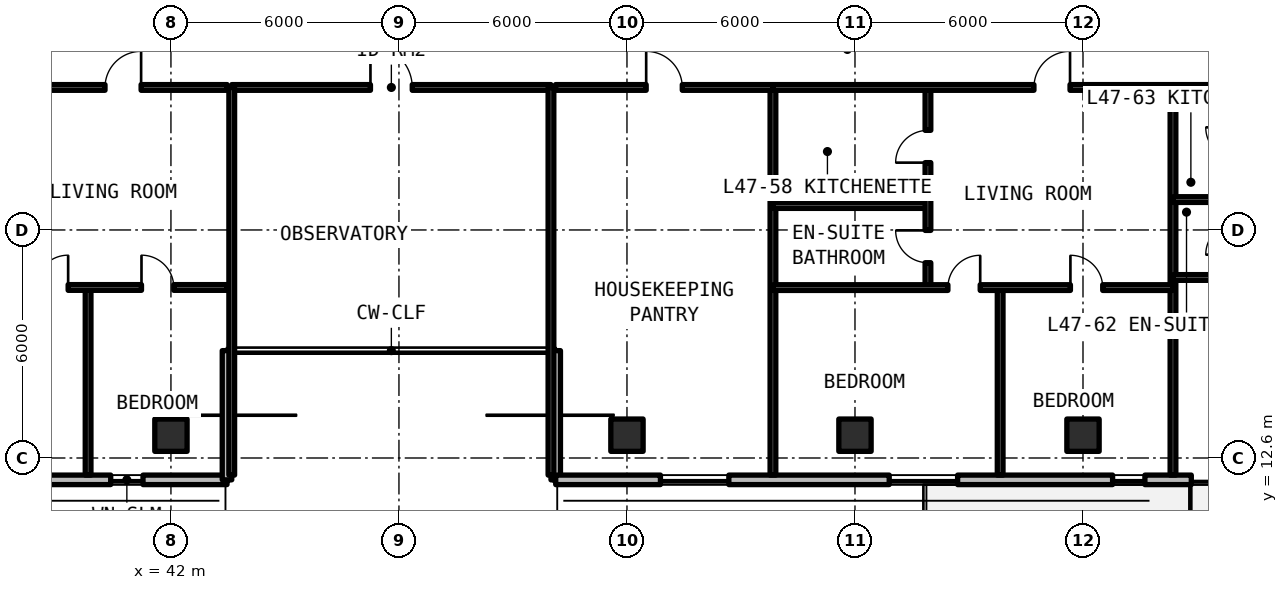
"""IFC4 building model, lengths in metres.
Left out: names, types, materials, properties, quantities, classifications, styles, units other than length and angle.
Written with IfcOpenShell. Run it as: python <this file> out.ifc"""

import sys

from ifc_helpers import new_model, si_unit, direction, frame, frame_2d, origin, origin_2d, place, context, subcontext, project, spatial, rectangle, extrude, element, fill, save


model = new_model("IFC4")
c1 = context("Model", 3, precision=1e-05, world=origin(), true_north=direction((0.0, 1.0)))
c2 = subcontext(c1, "Body", "Model", "MODEL_VIEW")
j1 = project(units=[si_unit("LENGTHUNIT", "METRE"), si_unit("PLANEANGLEUNIT", "RADIAN")], contexts=[c1])
p1 = place(None, origin())
s1 = spatial("IfcSite", under=j1, at=p1, CompositionType="ELEMENT")
p2 = place(p1, origin())
s2 = spatial("IfcBuilding", under=s1, at=p2, CompositionType="ELEMENT")
p3 = place(p2, frame((0.0, 0.0, 169.29)))
s3 = spatial("IfcBuildingStorey", under=s2, at=p3, CompositionType="ELEMENT", Elevation=169.29)
for number, where, z_axis, x_axis in (
    (1, (42.0, 13.2, 0.0), (0.0, 0.0, 1.0), (1.0, 0.0, 0.0)),
    (2, (54.0, 13.2, 0.0), (0.0, 0.0, 1.0), (1.0, 0.0, 0.0)),
    (3, (60.0, 13.2, 0.0), (0.0, 0.0, 1.0), (1.0, 0.0, 0.0)),
    (4, (66.0, 13.2, 0.0), (0.0, 0.0, 1.0), (1.0, 0.0, 0.0)),
):
    element("IfcColumn", number, at=place(p3, frame(where, z_axis=z_axis, x_axis=x_axis)), inside=s3, PredefinedType="COLUMN", context=c2, shape_type="SweptSolid", body=[
        extrude(rectangle(XDim=0.85, YDim=0.85, at=origin_2d()), origin(), (0.0, 0.0, 1.0), 3.63),
    ])
p4 = place(p3, frame((23.852, 12.025, 0.0), z_axis=(0.0, 0.0, 1.0), x_axis=(1.0, 0.0, 0.0)))
e5 = element("IfcWall", 5, at=p4, inside=s3, PredefinedType="SOLIDWALL", context=c2, shape_type="SweptSolid", body=[
    extrude(rectangle(XDim=19.623, YDim=0.25, at=frame_2d((9.812, 0.0))), origin(), (0.0, 0.0, 1.0), 3.35),
])
p5 = place(p4, frame((7.948, 0.0, 0.0)))
e6 = element("IfcOpeningElement", 6, at=p5, cuts=e5, PredefinedType="OPENING", context=c2, shape_type="SweptSolid", body=[
    extrude(rectangle(XDim=1.1, YDim=2.15, at=frame_2d((0.55, 1.075))), frame((0.0, 0.135, 0.0), z_axis=(0.0, -1.0, 0.0), x_axis=(1.0, 0.0, 0.0)), (0.0, 0.0, 1.0), 0.27),
])
p6 = place(p4, frame((1.818, 0.0, 0.78)))
e7 = element("IfcOpeningElement", 7, at=p6, cuts=e5, PredefinedType="OPENING", context=c2, shape_type="SweptSolid", body=[
    extrude(rectangle(XDim=1.8, YDim=1.66, at=frame_2d((0.9, 0.83))), frame((0.0, 0.135, 0.0), z_axis=(0.0, -1.0, 0.0), x_axis=(1.0, 0.0, 0.0)), (0.0, 0.0, 1.0), 0.27),
])
p7 = place(p4, frame((13.051, 0.0, 0.78)))
e8 = element("IfcOpeningElement", 8, at=p7, cuts=e5, PredefinedType="OPENING", context=c2, shape_type="SweptSolid", body=[
    extrude(rectangle(XDim=1.8, YDim=1.66, at=frame_2d((0.9, 0.83))), frame((0.0, 0.135, 0.0), z_axis=(0.0, -1.0, 0.0), x_axis=(1.0, 0.0, 0.0)), (0.0, 0.0, 1.0), 0.27),
])
p8 = place(p4, frame((16.563, 0.0, 0.78)))
e9 = element("IfcOpeningElement", 9, at=p8, cuts=e5, PredefinedType="OPENING", context=c2, shape_type="SweptSolid", body=[
    extrude(rectangle(XDim=0.85, YDim=1.65, at=frame_2d((0.425, 0.825))), frame((0.0, 0.135, 0.0), z_axis=(0.0, -1.0, 0.0), x_axis=(1.0, 0.0, 0.0)), (0.0, 0.0, 1.0), 0.27),
])
for number, where, z_axis, x_axis in (
    (10, (43.475, 12.025, 0.0), (0.0, 0.0, 1.0), (0.0, 1.0, 0.0)),
    (11, (52.125, 15.425, 0.0), (0.0, 0.0, 1.0), (0.0, -1.0, 0.0)),
):
    element("IfcWall", number, at=place(p3, frame(where, z_axis=z_axis, x_axis=x_axis)), inside=s3, PredefinedType="SOLIDWALL", context=c2, shape_type="SweptSolid", body=[
        extrude(rectangle(XDim=3.4, YDim=0.25, at=frame_2d((1.7, 0.0))), origin(), (0.0, 0.0, 1.0), 3.35),
    ])
p9 = place(p3, frame((52.125, 12.025, 0.0), z_axis=(0.0, 0.0, 1.0), x_axis=(1.0, 0.0, 0.0)))
e12 = element("IfcWall", 12, at=p9, inside=s3, PredefinedType="SOLIDWALL", context=c2, shape_type="SweptSolid", body=[
    extrude(rectangle(XDim=43.623, YDim=0.25, at=frame_2d((21.812, 0.0))), origin(), (0.0, 0.0, 1.0), 3.35),
])
p10 = place(p9, frame((16.725, 0.0, 0.0)))
e13 = element("IfcOpeningElement", 13, at=p10, cuts=e12, PredefinedType="OPENING", context=c2, shape_type="SweptSolid", body=[
    extrude(rectangle(XDim=1.1, YDim=2.15, at=frame_2d((0.55, 1.075))), frame((0.0, 0.135, 0.0), z_axis=(0.0, -1.0, 0.0), x_axis=(1.0, 0.0, 0.0)), (0.0, 0.0, 1.0), 0.27),
])
p11 = place(p9, frame((27.575, 0.0, 0.0)))
e14 = element("IfcOpeningElement", 14, at=p11, cuts=e12, PredefinedType="OPENING", context=c2, shape_type="SweptSolid", body=[
    extrude(rectangle(XDim=1.1, YDim=2.15, at=frame_2d((0.55, 1.075))), frame((0.0, 0.135, 0.0), z_axis=(0.0, -1.0, 0.0), x_axis=(1.0, 0.0, 0.0)), (0.0, 0.0, 1.0), 0.27),
])
p12 = place(p9, frame((2.756, 0.0, 0.78)))
e15 = element("IfcOpeningElement", 15, at=p12, cuts=e12, PredefinedType="OPENING", context=c2, shape_type="SweptSolid", body=[
    extrude(rectangle(XDim=1.8, YDim=1.66, at=frame_2d((0.9, 0.83))), frame((0.0, 0.135, 0.0), z_axis=(0.0, -1.0, 0.0), x_axis=(1.0, 0.0, 0.0)), (0.0, 0.0, 1.0), 0.27),
])
p13 = place(p9, frame((8.776, 0.0, 0.78)))
e16 = element("IfcOpeningElement", 16, at=p13, cuts=e12, PredefinedType="OPENING", context=c2, shape_type="SweptSolid", body=[
    extrude(rectangle(XDim=1.8, YDim=1.66, at=frame_2d((0.9, 0.83))), frame((0.0, 0.135, 0.0), z_axis=(0.0, -1.0, 0.0), x_axis=(1.0, 0.0, 0.0)), (0.0, 0.0, 1.0), 0.27),
])
p14 = place(p9, frame((14.654, 0.0, 0.78)))
e17 = element("IfcOpeningElement", 17, at=p14, cuts=e12, PredefinedType="OPENING", context=c2, shape_type="SweptSolid", body=[
    extrude(rectangle(XDim=0.85, YDim=1.65, at=frame_2d((0.425, 0.825))), frame((0.0, 0.135, 0.0), z_axis=(0.0, -1.0, 0.0), x_axis=(1.0, 0.0, 0.0)), (0.0, 0.0, 1.0), 0.27),
])
p15 = place(p9, frame((23.159, 0.0, 0.78)))
e18 = element("IfcOpeningElement", 18, at=p15, cuts=e12, PredefinedType="OPENING", context=c2, shape_type="SweptSolid", body=[
    extrude(rectangle(XDim=1.8, YDim=1.66, at=frame_2d((0.9, 0.83))), frame((0.0, 0.135, 0.0), z_axis=(0.0, -1.0, 0.0), x_axis=(1.0, 0.0, 0.0)), (0.0, 0.0, 1.0), 0.27),
])
p16 = place(p9, frame((38.451, 0.0, 0.78)))
e19 = element("IfcOpeningElement", 19, at=p16, cuts=e12, PredefinedType="OPENING", context=c2, shape_type="SweptSolid", body=[
    extrude(rectangle(XDim=0.85, YDim=1.65, at=frame_2d((0.425, 0.825))), frame((0.0, 0.135, 0.0), z_axis=(0.0, -1.0, 0.0), x_axis=(1.0, 0.0, 0.0)), (0.0, 0.0, 1.0), 0.27),
])
p17 = place(p9, frame((40.725, 0.0, 0.78)))
e20 = element("IfcOpeningElement", 20, at=p17, cuts=e12, PredefinedType="OPENING", context=c2, shape_type="SweptSolid", body=[
    extrude(rectangle(XDim=1.8, YDim=1.66, at=frame_2d((0.9, 0.83))), frame((0.0, 0.135, 0.0), z_axis=(0.0, -1.0, 0.0), x_axis=(1.0, 0.0, 0.0)), (0.0, 0.0, 1.0), 0.27),
])
p18 = place(p3, frame((43.6, 22.35, 0.0), z_axis=(0.0, 0.0, 1.0), x_axis=(1.0, 0.0, 0.0)))
e21 = element("IfcWall", 21, at=p18, inside=s3, PredefinedType="SOLIDWALL", context=c2, shape_type="SweptSolid", body=[
    extrude(rectangle(XDim=8.4, YDim=0.15, at=frame_2d((4.2, 0.0))), origin(), (0.0, 0.0, 1.0), 2.57),
])
p19 = place(p18, frame((3.65, 0.0, 0.0)))
e22 = element("IfcOpeningElement", 22, at=p19, cuts=e21, PredefinedType="OPENING", context=c2, shape_type="SweptSolid", body=[
    extrude(rectangle(XDim=1.1, YDim=2.15, at=frame_2d((0.55, 1.075))), frame((0.0, 0.085, 0.0), z_axis=(0.0, -1.0, 0.0), x_axis=(1.0, 0.0, 0.0)), (0.0, 0.0, 1.0), 0.17),
])
for number, where, z_axis, x_axis in (
    (23, (43.6, 12.15, 0.0), (0.0, 0.0, 1.0), (0.0, 1.0, 0.0)),
    (24, (52.0, 12.15, 0.0), (0.0, 0.0, 1.0), (0.0, 1.0, 0.0)),
):
    element("IfcWall", number, at=place(p3, frame(where, z_axis=z_axis, x_axis=x_axis)), inside=s3, PredefinedType="SOLIDWALL", context=c2, shape_type="SweptSolid", body=[
        extrude(rectangle(XDim=10.2, YDim=0.15, at=frame_2d((5.1, 0.0))), origin(), (0.0, 0.0, 1.0), 2.57),
    ])
p20 = place(p3, frame((39.82, 12.15, 0.0), z_axis=(0.0, 0.0, 1.0), x_axis=(0.0, 1.0, 0.0)))
e25 = element("IfcWall", 25, at=p20, inside=s3, PredefinedType="PARTITIONING", context=c2, shape_type="SweptSolid", body=[
    extrude(rectangle(XDim=4.937, YDim=0.15, at=frame_2d((2.469, 0.0))), origin(), (0.0, 0.0, 1.0), 2.57),
])
p21 = place(p3, frame((33.845, 17.087, 0.0), z_axis=(0.0, 0.0, 1.0), x_axis=(1.0, 0.0, 0.0)))
e26 = element("IfcWall", 26, at=p21, inside=s3, PredefinedType="PARTITIONING", context=c2, shape_type="SweptSolid", body=[
    extrude(rectangle(XDim=9.635, YDim=0.15, at=frame_2d((4.818, 0.0))), origin(), (0.0, 0.0, 1.0), 2.57),
])
p22 = place(p21, frame((4.6, 0.0, 0.0)))
e27 = element("IfcOpeningElement", 27, at=p22, cuts=e26, PredefinedType="OPENING", context=c2, shape_type="SweptSolid", body=[
    extrude(rectangle(XDim=0.85, YDim=2.1, at=frame_2d((0.425, 1.05))), frame((0.0, 0.085, 0.0), z_axis=(0.0, -1.0, 0.0), x_axis=(1.0, 0.0, 0.0)), (0.0, 0.0, 1.0), 0.17),
])
p23 = place(p21, frame((7.38, 0.0, 0.0)))
e28 = element("IfcOpeningElement", 28, at=p23, cuts=e26, PredefinedType="OPENING", context=c2, shape_type="SweptSolid", body=[
    extrude(rectangle(XDim=0.85, YDim=2.1, at=frame_2d((0.425, 1.05))), frame((0.0, 0.085, 0.0), z_axis=(0.0, -1.0, 0.0), x_axis=(1.0, 0.0, 0.0)), (0.0, 0.0, 1.0), 0.17),
])
p24 = place(p3, frame((33.845, 22.35, 0.0), z_axis=(0.0, 0.0, 1.0), x_axis=(1.0, 0.0, 0.0)))
e29 = element("IfcWall", 29, at=p24, inside=s3, PredefinedType="SOLIDWALL", context=c2, shape_type="SweptSolid", body=[
    extrude(rectangle(XDim=9.635, YDim=0.15, at=frame_2d((4.818, 0.0))), origin(), (0.0, 0.0, 1.0), 2.57),
])
p25 = place(p24, frame((6.42, 0.0, 0.0)))
e30 = element("IfcOpeningElement", 30, at=p25, cuts=e29, PredefinedType="OPENING", context=c2, shape_type="SweptSolid", body=[
    extrude(rectangle(XDim=0.95, YDim=2.15, at=frame_2d((0.475, 1.075))), frame((0.0, 0.085, 0.0), z_axis=(0.0, -1.0, 0.0), x_axis=(1.0, 0.0, 0.0)), (0.0, 0.0, 1.0), 0.17),
])
p26 = place(p3, frame((57.841, 12.15, 0.0), z_axis=(0.0, 0.0, 1.0), x_axis=(0.0, 1.0, 0.0)))
e31 = element("IfcWall", 31, at=p26, inside=s3, PredefinedType="SOLIDWALL", context=c2, shape_type="SweptSolid", body=[
    extrude(rectangle(XDim=10.2, YDim=0.15, at=frame_2d((5.1, 0.0))), origin(), (0.0, 0.0, 1.0), 2.57),
])
p27 = place(p3, frame((52.12, 22.35, 0.0), z_axis=(0.0, 0.0, 1.0), x_axis=(1.0, 0.0, 0.0)))
e32 = element("IfcWall", 32, at=p27, inside=s3, PredefinedType="SOLIDWALL", context=c2, shape_type="SweptSolid", body=[
    extrude(rectangle(XDim=5.721, YDim=0.15, at=frame_2d((2.86, 0.0))), origin(), (0.0, 0.0, 1.0), 2.57),
])
p28 = place(p27, frame((2.385, 0.0, 0.0)))
e33 = element("IfcOpeningElement", 33, at=p28, cuts=e32, PredefinedType="OPENING", context=c2, shape_type="SweptSolid", body=[
    extrude(rectangle(XDim=0.95, YDim=2.15, at=frame_2d((0.475, 1.075))), frame((0.0, 0.085, 0.0), z_axis=(0.0, -1.0, 0.0), x_axis=(1.0, 0.0, 0.0)), (0.0, 0.0, 1.0), 0.17),
])
p29 = place(p3, frame((68.368, 12.15, 0.0), z_axis=(0.0, 0.0, 1.0), x_axis=(0.0, 1.0, 0.0)))
e34 = element("IfcWall", 34, at=p29, inside=s3, PredefinedType="SOLIDWALL", context=c2, shape_type="SweptSolid", body=[
    extrude(rectangle(XDim=10.2, YDim=0.15, at=frame_2d((5.1, 0.0))), origin(), (0.0, 0.0, 1.0), 2.57),
])
p30 = place(p3, frame((57.841, 19.243, 0.0), z_axis=(0.0, 0.0, 1.0), x_axis=(1.0, 0.0, 0.0)))
e35 = element("IfcWall", 35, at=p30, inside=s3, PredefinedType="PARTITIONING", context=c2, shape_type="SweptSolid", body=[
    extrude(rectangle(XDim=4.079, YDim=0.15, at=frame_2d((2.04, 0.0))), origin(), (0.0, 0.0, 1.0), 2.57),
])
p31 = place(p3, frame((61.92, 17.084, 0.0), z_axis=(0.0, 0.0, 1.0), x_axis=(0.0, 1.0, 0.0)))
e36 = element("IfcWall", 36, at=p31, inside=s3, PredefinedType="PARTITIONING", context=c2, shape_type="SweptSolid", body=[
    extrude(rectangle(XDim=5.266, YDim=0.15, at=frame_2d((2.633, 0.0))), origin(), (0.0, 0.0, 1.0), 2.57),
])
p32 = place(p31, frame((0.655, 0.0, 0.0)))
e37 = element("IfcOpeningElement", 37, at=p32, cuts=e36, PredefinedType="OPENING", context=c2, shape_type="SweptSolid", body=[
    extrude(rectangle(XDim=0.85, YDim=2.1, at=frame_2d((0.425, 1.05))), frame((0.0, 0.085, 0.0), z_axis=(0.0, -1.0, 0.0), x_axis=(1.0, 0.0, 0.0)), (0.0, 0.0, 1.0), 0.17),
])
p33 = place(p31, frame((3.288, 0.0, 0.0)))
e38 = element("IfcOpeningElement", 38, at=p33, cuts=e36, PredefinedType="OPENING", context=c2, shape_type="SweptSolid", body=[
    extrude(rectangle(XDim=0.85, YDim=2.1, at=frame_2d((0.425, 1.05))), frame((0.0, 0.085, 0.0), z_axis=(0.0, -1.0, 0.0), x_axis=(1.0, 0.0, 0.0)), (0.0, 0.0, 1.0), 0.17),
])
p34 = place(p3, frame((63.82, 12.15, 0.0), z_axis=(0.0, 0.0, 1.0), x_axis=(0.0, 1.0, 0.0)))
e39 = element("IfcWall", 39, at=p34, inside=s3, PredefinedType="PARTITIONING", context=c2, shape_type="SweptSolid", body=[
    extrude(rectangle(XDim=4.934, YDim=0.15, at=frame_2d((2.467, 0.0))), origin(), (0.0, 0.0, 1.0), 2.57),
])
p35 = place(p3, frame((57.841, 17.084, 0.0), z_axis=(0.0, 0.0, 1.0), x_axis=(1.0, 0.0, 0.0)))
e40 = element("IfcWall", 40, at=p35, inside=s3, PredefinedType="PARTITIONING", context=c2, shape_type="SweptSolid", body=[
    extrude(rectangle(XDim=10.527, YDim=0.15, at=frame_2d((5.263, 0.0))), origin(), (0.0, 0.0, 1.0), 2.57),
])
p36 = place(p35, frame((4.604, 0.0, 0.0)))
e41 = element("IfcOpeningElement", 41, at=p36, cuts=e40, PredefinedType="OPENING", context=c2, shape_type="SweptSolid", body=[
    extrude(rectangle(XDim=0.85, YDim=2.1, at=frame_2d((0.425, 1.05))), frame((0.0, 0.085, 0.0), z_axis=(0.0, -1.0, 0.0), x_axis=(1.0, 0.0, 0.0)), (0.0, 0.0, 1.0), 0.17),
])
p37 = place(p35, frame((7.828, 0.0, 0.0)))
e42 = element("IfcOpeningElement", 42, at=p37, cuts=e40, PredefinedType="OPENING", context=c2, shape_type="SweptSolid", body=[
    extrude(rectangle(XDim=0.85, YDim=2.1, at=frame_2d((0.425, 1.05))), frame((0.0, 0.085, 0.0), z_axis=(0.0, -1.0, 0.0), x_axis=(1.0, 0.0, 0.0)), (0.0, 0.0, 1.0), 0.17),
])
p38 = place(p3, frame((57.841, 22.35, 0.0), z_axis=(0.0, 0.0, 1.0), x_axis=(1.0, 0.0, 0.0)))
e43 = element("IfcWall", 43, at=p38, inside=s3, PredefinedType="SOLIDWALL", context=c2, shape_type="SweptSolid", body=[
    extrude(rectangle(XDim=10.527, YDim=0.15, at=frame_2d((5.263, 0.0))), origin(), (0.0, 0.0, 1.0), 2.57),
])
p39 = place(p38, frame((6.868, 0.0, 0.0)))
e44 = element("IfcOpeningElement", 44, at=p39, cuts=e43, PredefinedType="OPENING", context=c2, shape_type="SweptSolid", body=[
    extrude(rectangle(XDim=0.95, YDim=2.15, at=frame_2d((0.475, 1.075))), frame((0.0, 0.085, 0.0), z_axis=(0.0, -1.0, 0.0), x_axis=(1.0, 0.0, 0.0)), (0.0, 0.0, 1.0), 0.17),
])
p40 = place(p3, frame((68.368, 19.4, 0.0), z_axis=(0.0, 0.0, 1.0), x_axis=(1.0, 0.0, 0.0)))
e45 = element("IfcWall", 45, at=p40, inside=s3, PredefinedType="PARTITIONING", context=c2, shape_type="SweptSolid", body=[
    extrude(rectangle(XDim=1.712, YDim=0.15, at=frame_2d((0.856, 0.0))), origin(), (0.0, 0.0, 1.0), 2.57),
])
p41 = place(p3, frame((68.368, 17.35, 0.0), z_axis=(0.0, 0.0, 1.0), x_axis=(1.0, 0.0, 0.0)))
e46 = element("IfcWall", 46, at=p41, inside=s3, PredefinedType="PARTITIONING", context=c2, shape_type="SweptSolid", body=[
    extrude(rectangle(XDim=10.298, YDim=0.15, at=frame_2d((5.149, 0.0))), origin(), (0.0, 0.0, 1.0), 2.57),
])
p42 = place(p41, frame((3.109, 0.0, 0.0)))
e47 = element("IfcOpeningElement", 47, at=p42, cuts=e46, PredefinedType="OPENING", context=c2, shape_type="SweptSolid", body=[
    extrude(rectangle(XDim=0.85, YDim=2.1, at=frame_2d((0.425, 1.05))), frame((0.0, 0.085, 0.0), z_axis=(0.0, -1.0, 0.0), x_axis=(1.0, 0.0, 0.0)), (0.0, 0.0, 1.0), 0.17),
])
p43 = place(p41, frame((7.401, 0.0, 0.0)))
e48 = element("IfcOpeningElement", 48, at=p43, cuts=e46, PredefinedType="OPENING", context=c2, shape_type="SweptSolid", body=[
    extrude(rectangle(XDim=0.85, YDim=2.1, at=frame_2d((0.425, 1.05))), frame((0.0, 0.085, 0.0), z_axis=(0.0, -1.0, 0.0), x_axis=(1.0, 0.0, 0.0)), (0.0, 0.0, 1.0), 0.17),
])
p44 = place(p3, frame((68.368, 22.35, 0.0), z_axis=(0.0, 0.0, 1.0), x_axis=(1.0, 0.0, 0.0)))
e49 = element("IfcWall", 49, at=p44, inside=s3, PredefinedType="SOLIDWALL", context=c2, shape_type="SweptSolid", body=[
    extrude(rectangle(XDim=10.298, YDim=0.15, at=frame_2d((5.149, 0.0))), origin(), (0.0, 0.0, 1.0), 2.57),
])
p45 = place(p44, frame((5.57, 0.0, 0.0)))
e50 = element("IfcOpeningElement", 50, at=p45, cuts=e49, PredefinedType="OPENING", context=c2, shape_type="SweptSolid", body=[
    extrude(rectangle(XDim=0.95, YDim=2.15, at=frame_2d((0.475, 1.075))), frame((0.0, 0.085, 0.0), z_axis=(0.0, -1.0, 0.0), x_axis=(1.0, 0.0, 0.0)), (0.0, 0.0, 1.0), 0.17),
])
p46 = place(p8, origin())
e51 = element("IfcWindow", 51, at=p46, inside=s3, PartitioningType="SINGLE_PANEL", PredefinedType="WINDOW", context=c2, shape_type="SweptSolid", body=[
    extrude(rectangle(XDim=0.85, YDim=1.65, at=frame_2d((0.425, 0.825))), frame((0.0, 0.03, 0.0), z_axis=(0.0, -1.0, 0.0), x_axis=(1.0, 0.0, 0.0)), (0.0, 0.0, 1.0), 0.06),
])
fill(e9, e51)
p47 = place(p10, frame((1.1, 0.0, 0.0), z_axis=(0.0, 0.0, 1.0), x_axis=(-1.0, 0.0, 0.0)))
e52 = element("IfcDoor", 52, at=p47, inside=s3, OperationType="SINGLE_SWING_LEFT", PredefinedType="DOOR", context=c2, shape_type="SweptSolid", body=[
    extrude(rectangle(XDim=1.1, YDim=2.15, at=frame_2d((0.55, 1.075))), frame((0.0, 0.025, 0.0), z_axis=(0.0, -1.0, 0.0), x_axis=(1.0, 0.0, 0.0)), (0.0, 0.0, 1.0), 0.05),
])
fill(e13, e52)
p48 = place(p12, origin())
e53 = element("IfcWindow", 53, at=p48, inside=s3, PartitioningType="SINGLE_PANEL", PredefinedType="WINDOW", context=c2, shape_type="SweptSolid", body=[
    extrude(rectangle(XDim=1.8, YDim=1.66, at=frame_2d((0.9, 0.83))), frame((0.0, 0.03, 0.0), z_axis=(0.0, -1.0, 0.0), x_axis=(1.0, 0.0, 0.0)), (0.0, 0.0, 1.0), 0.06),
])
fill(e15, e53)
p49 = place(p13, origin())
e54 = element("IfcWindow", 54, at=p49, inside=s3, PartitioningType="SINGLE_PANEL", PredefinedType="WINDOW", context=c2, shape_type="SweptSolid", body=[
    extrude(rectangle(XDim=1.8, YDim=1.66, at=frame_2d((0.9, 0.83))), frame((0.0, 0.03, 0.0), z_axis=(0.0, -1.0, 0.0), x_axis=(1.0, 0.0, 0.0)), (0.0, 0.0, 1.0), 0.06),
])
fill(e16, e54)
p50 = place(p14, origin())
e55 = element("IfcWindow", 55, at=p50, inside=s3, PartitioningType="SINGLE_PANEL", PredefinedType="WINDOW", context=c2, shape_type="SweptSolid", body=[
    extrude(rectangle(XDim=0.85, YDim=1.65, at=frame_2d((0.425, 0.825))), frame((0.0, 0.03, 0.0), z_axis=(0.0, -1.0, 0.0), x_axis=(1.0, 0.0, 0.0)), (0.0, 0.0, 1.0), 0.06),
])
fill(e17, e55)
p51 = place(p19, origin())
e56 = element("IfcDoor", 56, at=p51, inside=s3, OperationType="SINGLE_SWING_LEFT", PredefinedType="DOOR", context=c2, shape_type="SweptSolid", body=[
    extrude(rectangle(XDim=1.1, YDim=2.15, at=frame_2d((0.55, 1.075))), frame((0.0, 0.025, 0.0), z_axis=(0.0, -1.0, 0.0), x_axis=(1.0, 0.0, 0.0)), (0.0, 0.0, 1.0), 0.05),
])
fill(e22, e56)
p52 = place(p22, origin())
e57 = element("IfcDoor", 57, at=p52, inside=s3, OperationType="SINGLE_SWING_RIGHT", PredefinedType="DOOR", context=c2, shape_type="SweptSolid", body=[
    extrude(rectangle(XDim=0.85, YDim=2.1, at=frame_2d((0.425, 1.05))), frame((0.0, 0.025, 0.0), z_axis=(0.0, -1.0, 0.0), x_axis=(1.0, 0.0, 0.0)), (0.0, 0.0, 1.0), 0.05),
])
fill(e27, e57)
p53 = place(p23, origin())
e58 = element("IfcDoor", 58, at=p53, inside=s3, OperationType="SINGLE_SWING_LEFT", PredefinedType="DOOR", context=c2, shape_type="SweptSolid", body=[
    extrude(rectangle(XDim=0.85, YDim=2.1, at=frame_2d((0.425, 1.05))), frame((0.0, 0.025, 0.0), z_axis=(0.0, -1.0, 0.0), x_axis=(1.0, 0.0, 0.0)), (0.0, 0.0, 1.0), 0.05),
])
fill(e28, e58)
p54 = place(p25, origin())
e59 = element("IfcDoor", 59, at=p54, inside=s3, OperationType="SINGLE_SWING_RIGHT", PredefinedType="DOOR", context=c2, shape_type="SweptSolid", body=[
    extrude(rectangle(XDim=0.95, YDim=2.15, at=frame_2d((0.475, 1.075))), frame((0.0, 0.025, 0.0), z_axis=(0.0, -1.0, 0.0), x_axis=(1.0, 0.0, 0.0)), (0.0, 0.0, 1.0), 0.05),
])
fill(e30, e59)
p55 = place(p28, origin())
e60 = element("IfcDoor", 60, at=p55, inside=s3, OperationType="SINGLE_SWING_LEFT", PredefinedType="DOOR", context=c2, shape_type="SweptSolid", body=[
    extrude(rectangle(XDim=0.95, YDim=2.15, at=frame_2d((0.475, 1.075))), frame((0.0, 0.025, 0.0), z_axis=(0.0, -1.0, 0.0), x_axis=(1.0, 0.0, 0.0)), (0.0, 0.0, 1.0), 0.05),
])
fill(e33, e60)
p56 = place(p32, origin())
e61 = element("IfcDoor", 61, at=p56, inside=s3, OperationType="SINGLE_SWING_RIGHT", PredefinedType="DOOR", context=c2, shape_type="SweptSolid", body=[
    extrude(rectangle(XDim=0.85, YDim=2.1, at=frame_2d((0.425, 1.05))), frame((0.0, 0.025, 0.0), z_axis=(0.0, -1.0, 0.0), x_axis=(1.0, 0.0, 0.0)), (0.0, 0.0, 1.0), 0.05),
])
fill(e37, e61)
p57 = place(p33, origin())
e62 = element("IfcDoor", 62, at=p57, inside=s3, OperationType="SINGLE_SWING_LEFT", PredefinedType="DOOR", context=c2, shape_type="SweptSolid", body=[
    extrude(rectangle(XDim=0.85, YDim=2.1, at=frame_2d((0.425, 1.05))), frame((0.0, 0.025, 0.0), z_axis=(0.0, -1.0, 0.0), x_axis=(1.0, 0.0, 0.0)), (0.0, 0.0, 1.0), 0.05),
])
fill(e38, e62)
p58 = place(p36, origin())
e63 = element("IfcDoor", 63, at=p58, inside=s3, OperationType="SINGLE_SWING_RIGHT", PredefinedType="DOOR", context=c2, shape_type="SweptSolid", body=[
    extrude(rectangle(XDim=0.85, YDim=2.1, at=frame_2d((0.425, 1.05))), frame((0.0, 0.025, 0.0), z_axis=(0.0, -1.0, 0.0), x_axis=(1.0, 0.0, 0.0)), (0.0, 0.0, 1.0), 0.05),
])
fill(e41, e63)
p59 = place(p37, origin())
e64 = element("IfcDoor", 64, at=p59, inside=s3, OperationType="SINGLE_SWING_LEFT", PredefinedType="DOOR", context=c2, shape_type="SweptSolid", body=[
    extrude(rectangle(XDim=0.85, YDim=2.1, at=frame_2d((0.425, 1.05))), frame((0.0, 0.025, 0.0), z_axis=(0.0, -1.0, 0.0), x_axis=(1.0, 0.0, 0.0)), (0.0, 0.0, 1.0), 0.05),
])
fill(e42, e64)
p60 = place(p39, origin())
e65 = element("IfcDoor", 65, at=p60, inside=s3, OperationType="SINGLE_SWING_RIGHT", PredefinedType="DOOR", context=c2, shape_type="SweptSolid", body=[
    extrude(rectangle(XDim=0.95, YDim=2.15, at=frame_2d((0.475, 1.075))), frame((0.0, 0.025, 0.0), z_axis=(0.0, -1.0, 0.0), x_axis=(1.0, 0.0, 0.0)), (0.0, 0.0, 1.0), 0.05),
])
fill(e44, e65)
save(model, sys.argv[1])
